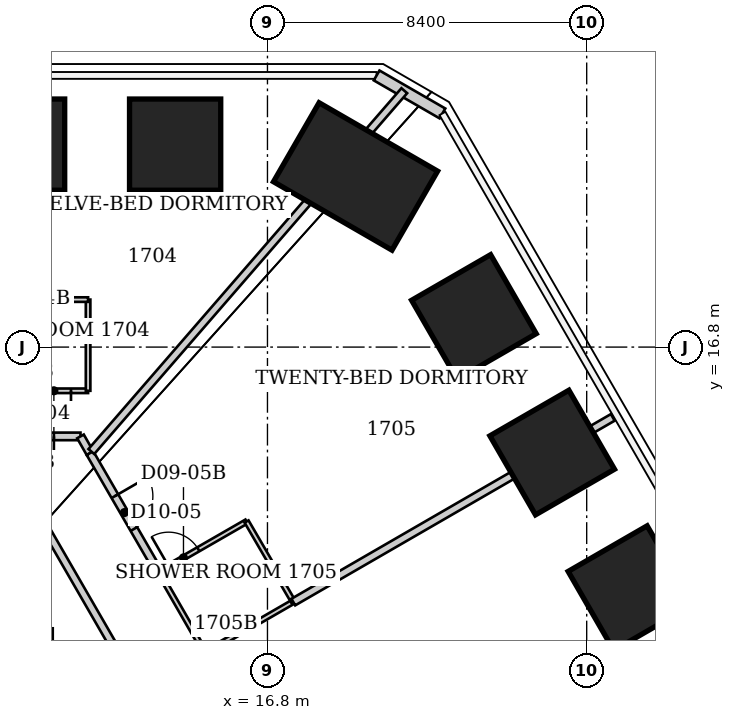
"""IFC4 building model, lengths in metres.
Left out: names, types, materials, properties, quantities, classifications, styles, units other than length and angle.
Written with IfcOpenShell. Run it as: python <this file> out.ifc"""

import sys

from ifc_helpers import new_model, si_unit, direction, frame, frame_2d, origin, origin_2d, place, context, subcontext, project, spatial, rectangle, extrude, element, fill, save


model = new_model("IFC4")
c1 = context("Model", 3, precision=1e-05, world=origin(), true_north=direction((0.0, 1.0)))
c2 = subcontext(c1, "Body", "Model", "MODEL_VIEW")
j1 = project(units=[si_unit("LENGTHUNIT", "METRE"), si_unit("PLANEANGLEUNIT", "RADIAN")], contexts=[c1])
p1 = place(None, origin())
s1 = spatial("IfcSite", under=j1, at=p1, CompositionType="ELEMENT")
p2 = place(p1, origin())
s2 = spatial("IfcBuilding", under=s1, at=p2, CompositionType="ELEMENT")
p3 = place(p2, frame((0.0, 0.0, 72.4)))
s3 = spatial("IfcBuildingStorey", under=s2, at=p3, CompositionType="ELEMENT", Elevation=72.4)
p4 = place(p3, frame((10.265, 22.128, 0.0), z_axis=(-0.017011430722, -0.036719012729, 0.999180827142), x_axis=(-0.001112013962, 0.99932551115, 0.036705397281)))
e1 = element("IfcColumn", 1, at=p4, inside=s3, PredefinedType="COLUMN", context=c2, shape_type="SweptSolid", body=[
    extrude(rectangle(XDim=2.4, YDim=2.4, at=origin_2d()), origin(), (0.0, 0.0, 1.0), 3.803),
])
p5 = place(p3, frame((14.37, 22.128, 0.0), z_axis=(-0.02387684412, -0.036713857088, 0.999040534219), x_axis=(-0.000229526905, 0.999325609369, 0.036718847706)))
e2 = element("IfcColumn", 2, at=p5, inside=s3, PredefinedType="COLUMN", context=c2, shape_type="SweptSolid", body=[
    extrude(rectangle(XDim=2.4, YDim=2.4, at=origin_2d()), origin(), (0.0, 0.0, 1.0), 3.804),
])
p6 = place(p3, frame((19.118, 21.291, 0.0), z_axis=(-0.031958280822, -0.035551983084, 0.998856708836), x_axis=(0.499520046627, 0.86503883454, 0.046771120948)))
e3 = element("IfcColumn", 3, at=p6, inside=s3, PredefinedType="COLUMN", context=c2, shape_type="SweptSolid", body=[
    extrude(rectangle(XDim=2.4, YDim=3.6, at=origin_2d()), origin(), (0.0, 0.0, 1.0), 3.804),
])
p7 = place(p3, frame((22.232, 17.593, 0.0), z_axis=(-0.036324527722, -0.028815747257, 0.998924512361), x_axis=(0.864659372814, 0.500259765891, 0.04587303822)))
e4 = element("IfcColumn", 4, at=p7, inside=s3, PredefinedType="COLUMN", context=c2, shape_type="SweptSolid", body=[
    extrude(rectangle(XDim=2.4, YDim=2.4, at=origin_2d()), origin(), (0.0, 0.0, 1.0), 3.804),
])
p8 = place(p3, frame((24.292, 14.025, 0.0), z_axis=(-0.039726869437, -0.02291194247, 0.998947855865), x_axis=(0.865344046472, 0.499075645542, 0.045860454239)))
e5 = element("IfcColumn", 5, at=p8, inside=s3, PredefinedType="COLUMN", context=c2, shape_type="SweptSolid", body=[
    extrude(rectangle(XDim=2.4, YDim=2.4, at=origin_2d()), origin(), (0.0, 0.0, 1.0), 3.804),
])
p9 = place(p3, frame((26.352, 10.458, 0.0), z_axis=(-0.043063214726, -0.017135437156, 0.998925390773), x_axis=(0.864497674409, 0.500540860582, 0.045854310909)))
e6 = element("IfcColumn", 6, at=p9, inside=s3, PredefinedType="COLUMN", context=c2, shape_type="SweptSolid", body=[
    extrude(rectangle(XDim=2.4, YDim=2.4, at=origin_2d()), origin(), (0.0, 0.0, 1.0), 3.804),
])
p10 = place(p3, frame((19.672, 23.949, 0.0), z_axis=(0.0, 0.0, 1.0), x_axis=(0.866010750942, -0.50002537861, 0.0)))
e7 = element("IfcWall", 7, at=p10, inside=s3, PredefinedType="SOLIDWALL", context=c2, shape_type="SweptSolid", body=[
    extrude(rectangle(XDim=2.0, YDim=0.3, at=frame_2d((1.0, 0.0))), origin(), (0.0, 0.0, 1.0), 3.64),
])
p11 = place(p3, frame((9.48, 15.65, 0.0), z_axis=(0.0, 0.0, 1.0), x_axis=(1.0, 0.0, 0.0)))
e8 = element("IfcWall", 8, at=p11, inside=s3, PredefinedType="PARTITIONING", context=c2, shape_type="SweptSolid", body=[
    extrude(rectangle(XDim=2.6, YDim=0.12, at=frame_2d((1.3, 0.0))), origin(), (0.0, 0.0, 1.0), 3.64),
])
p12 = place(p11, frame((1.25, 0.0, 0.0)))
e9 = element("IfcOpeningElement", 9, at=p12, cuts=e8, PredefinedType="OPENING", context=c2, shape_type="SweptSolid", body=[
    extrude(rectangle(XDim=0.9, YDim=2.03, at=frame_2d((0.45, 1.015))), frame((0.0, 0.06, 0.0), z_axis=(0.0, -1.0, 0.0), x_axis=(1.0, 0.0, 0.0)), (0.0, 0.0, 1.0), 0.12),
])
p13 = place(p3, frame((10.72, 12.45, 0.0), z_axis=(0.0, 0.0, 1.0), x_axis=(0.500087057827, -0.86597513509, 0.0)))
e10 = element("IfcWall", 10, at=p13, inside=s3, PredefinedType="PARTITIONING", context=c2, shape_type="SweptSolid", body=[
    extrude(rectangle(XDim=11.998, YDim=0.2, at=frame_2d((5.999, 0.0))), origin(), (0.0, 0.0, 1.0), 3.64),
])
p14 = place(p3, frame((11.05, -7.76, 0.0), z_axis=(0.0, 0.0, 1.0), x_axis=(0.0, 1.0, 0.0)))
e11 = element("IfcWall", 11, at=p14, inside=s3, PredefinedType="PARTITIONING", context=c2, shape_type="SweptSolid", body=[
    extrude(rectangle(XDim=17.16, YDim=0.2, at=frame_2d((8.58, 0.0))), origin(), (0.0, 0.0, 1.0), 3.64),
])
p15 = place(p14, frame((8.03, 0.0, 0.0)))
e12 = element("IfcOpeningElement", 12, at=p15, cuts=e11, PredefinedType="OPENING", context=c2, shape_type="SweptSolid", body=[
    extrude(rectangle(XDim=1.1, YDim=2.2, at=frame_2d((0.55, 1.1))), frame((0.0, 0.1, 0.0), z_axis=(0.0, -1.0, 0.0), x_axis=(1.0, 0.0, 0.0)), (0.0, 0.0, 1.0), 0.2),
])
p16 = place(p3, frame((11.88, 14.45, 0.0), z_axis=(0.0, 0.0, 1.0), x_axis=(-1.0, 0.0, 0.0)))
e13 = element("IfcWall", 13, at=p16, inside=s3, PredefinedType="PARTITIONING", context=c2, shape_type="SweptSolid", body=[
    extrude(rectangle(XDim=2.4, YDim=0.2, at=frame_2d((1.2, 0.0))), origin(), (0.0, 0.0, 1.0), 3.64),
])
p17 = place(p16, frame((0.7, 0.0, 0.0)))
e14 = element("IfcOpeningElement", 14, at=p17, cuts=e13, PredefinedType="OPENING", context=c2, shape_type="SweptSolid", body=[
    extrude(rectangle(XDim=1.0, YDim=2.13, at=frame_2d((0.5, 1.065))), frame((0.0, 0.1, 0.0), z_axis=(0.0, -1.0, 0.0), x_axis=(1.0, 0.0, 0.0)), (0.0, 0.0, 1.0), 0.2),
])
p18 = place(p3, frame((11.88, 14.45, 0.0), z_axis=(0.0, 0.0, 1.0), x_axis=(0.494423721727, -0.869221021026, 0.0)))
e15 = element("IfcWall", 15, at=p18, inside=s3, PredefinedType="PARTITIONING", context=c2, shape_type="SweptSolid", body=[
    extrude(rectangle(XDim=0.506, YDim=0.2, at=frame_2d((0.253, 0.0))), origin(), (0.0, 0.0, 1.0), 3.64),
])
p19 = place(p3, frame((12.08, 15.65, 0.0), z_axis=(0.0, 0.0, 1.0), x_axis=(0.0, 1.0, 0.0)))
e16 = element("IfcWall", 16, at=p19, inside=s3, PredefinedType="PARTITIONING", context=c2, shape_type="SweptSolid", body=[
    extrude(rectangle(XDim=2.4, YDim=0.12, at=frame_2d((1.2, 0.0))), origin(), (0.0, 0.0, 1.0), 3.64),
])
p20 = place(p3, frame((12.08, 18.05, 0.0), z_axis=(0.0, 0.0, 1.0), x_axis=(-1.0, 0.0, 0.0)))
e17 = element("IfcWall", 17, at=p20, inside=s3, PredefinedType="PARTITIONING", context=c2, shape_type="SweptSolid", body=[
    extrude(rectangle(XDim=2.6, YDim=0.12, at=frame_2d((1.3, 0.0))), origin(), (0.0, 0.0, 1.0), 3.64),
])
p21 = place(p3, frame((12.13, 14.01, 0.0), z_axis=(0.0, 0.0, 1.0), x_axis=(0.500597042564, -0.865680426587, 0.0)))
e18 = element("IfcWall", 18, at=p21, inside=s3, PredefinedType="PARTITIONING", context=c2, shape_type="SweptSolid", body=[
    extrude(rectangle(XDim=3.616, YDim=0.2, at=frame_2d((1.808, 0.0))), origin(), (0.0, 0.0, 1.0), 3.64),
])
p22 = place(p21, frame((1.308, 0.0, 0.0)))
e19 = element("IfcOpeningElement", 19, at=p22, cuts=e18, PredefinedType="OPENING", context=c2, shape_type="SweptSolid", body=[
    extrude(rectangle(XDim=1.0, YDim=2.13, at=frame_2d((0.5, 1.065))), frame((0.0, 0.1, 0.0), z_axis=(0.0, -1.0, 0.0), x_axis=(1.0, 0.0, 0.0)), (0.0, 0.0, 1.0), 0.2),
])
p23 = place(p3, frame((13.94, 10.88, 0.0), z_axis=(0.0, 0.0, 1.0), x_axis=(0.498791783817, -0.866721844883, 0.0)))
e20 = element("IfcWall", 20, at=p23, inside=s3, PredefinedType="PARTITIONING", context=c2, shape_type="SweptSolid", body=[
    extrude(rectangle(XDim=2.446, YDim=0.12, at=frame_2d((1.223, 0.0))), origin(), (0.0, 0.0, 1.0), 3.64),
])
p24 = place(p3, frame((15.16, 8.76, 0.0), z_axis=(0.0, 0.0, 1.0), x_axis=(0.865929097586, 0.500166770141, 0.0)))
e21 = element("IfcWall", 21, at=p24, inside=s3, PredefinedType="PARTITIONING", context=c2, shape_type="SweptSolid", body=[
    extrude(rectangle(XDim=2.679, YDim=0.12, at=frame_2d((1.34, 0.0))), origin(), (0.0, 0.0, 1.0), 2.86),
])
p25 = place(p3, frame((16.25, 12.21, 0.0), z_axis=(0.0, 0.0, 1.0), x_axis=(-0.866654860089, -0.498908161372, 0.0)))
e22 = element("IfcWall", 22, at=p25, inside=s3, PredefinedType="PARTITIONING", context=c2, shape_type="SweptSolid", body=[
    extrude(rectangle(XDim=2.666, YDim=0.12, at=frame_2d((1.333, 0.0))), origin(), (0.0, 0.0, 1.0), 3.64),
])
p26 = place(p25, frame((1.466, 0.0, 0.0)))
e23 = element("IfcOpeningElement", 23, at=p26, cuts=e22, PredefinedType="OPENING", context=c2, shape_type="SweptSolid", body=[
    extrude(rectangle(XDim=0.9, YDim=2.03, at=frame_2d((0.45, 1.015))), frame((0.0, 0.06, 0.0), z_axis=(0.0, -1.0, 0.0), x_axis=(1.0, 0.0, 0.0)), (0.0, 0.0, 1.0), 0.12),
])
p27 = place(p3, frame((17.48, 10.1, 0.0), z_axis=(0.0, 0.0, 1.0), x_axis=(-0.503634814725, 0.863916647251, 0.0)))
e24 = element("IfcWall", 24, at=p27, inside=s3, PredefinedType="PARTITIONING", context=c2, shape_type="SweptSolid", body=[
    extrude(rectangle(XDim=2.442, YDim=0.12, at=frame_2d((1.221, 0.0))), origin(), (0.0, 0.0, 1.0), 3.64),
])
p28 = place(p3, frame((20.4, 23.547, 0.0), z_axis=(0.0, 0.0, 1.0), x_axis=(-0.655141271043, -0.755506396383, 0.0)))
e25 = element("IfcWall", 25, at=p28, inside=s3, PredefinedType="PARTITIONING", context=c2, shape_type="SweptSolid", body=[
    extrude(rectangle(XDim=12.569, YDim=0.2, at=frame_2d((6.284, 0.0))), origin(), (0.0, 0.0, 1.0), 3.64),
])
p29 = place(p3, frame((25.886, 14.95, 0.0), z_axis=(0.0, 0.0, 1.0), x_axis=(-0.865734831114, -0.500502949238, 0.0)))
e26 = element("IfcWall", 26, at=p29, inside=s3, PredefinedType="PARTITIONING", context=c2, shape_type="SweptSolid", body=[
    extrude(rectangle(XDim=9.71, YDim=0.2, at=frame_2d((4.855, 0.0))), origin(), (0.0, 0.0, 1.0), 2.86),
])
p30 = place(p17, origin())
e27 = element("IfcDoor", 27, at=p30, inside=s3, OperationType="SINGLE_SWING_LEFT", PredefinedType="DOOR", context=c2, shape_type="SweptSolid", body=[
    extrude(rectangle(XDim=1.0, YDim=2.13, at=frame_2d((0.5, 1.065))), frame((0.0, 0.025, 0.0), z_axis=(0.0, -1.0, 0.0), x_axis=(1.0, 0.0, 0.0)), (0.0, 0.0, 1.0), 0.05),
])
fill(e14, e27)
p31 = place(p12, origin())
e28 = element("IfcDoor", 28, at=p31, inside=s3, OperationType="SINGLE_SWING_RIGHT", PredefinedType="DOOR", context=c2, shape_type="SweptSolid", body=[
    extrude(rectangle(XDim=0.9, YDim=2.03, at=frame_2d((0.45, 1.015))), frame((0.0, 0.025, 0.0), z_axis=(0.0, -1.0, 0.0), x_axis=(1.0, 0.0, 0.0)), (0.0, 0.0, 1.0), 0.05),
])
fill(e9, e28)
p32 = place(p22, origin())
e29 = element("IfcDoor", 29, at=p32, inside=s3, OperationType="SINGLE_SWING_LEFT", PredefinedType="DOOR", context=c2, shape_type="SweptSolid", body=[
    extrude(rectangle(XDim=1.0, YDim=2.13, at=frame_2d((0.5, 1.065))), frame((0.0, 0.025, 0.0), z_axis=(0.0, -1.0, 0.0), x_axis=(1.0, 0.0, 0.0)), (0.0, 0.0, 1.0), 0.05),
])
fill(e19, e29)
p33 = place(p26, origin())
e30 = element("IfcDoor", 30, at=p33, inside=s3, OperationType="SINGLE_SWING_RIGHT", PredefinedType="DOOR", context=c2, shape_type="SweptSolid", body=[
    extrude(rectangle(XDim=0.9, YDim=2.03, at=frame_2d((0.45, 1.015))), frame((0.0, 0.025, 0.0), z_axis=(0.0, -1.0, 0.0), x_axis=(1.0, 0.0, 0.0)), (0.0, 0.0, 1.0), 0.05),
])
fill(e23, e30)
save(model, sys.argv[1])
